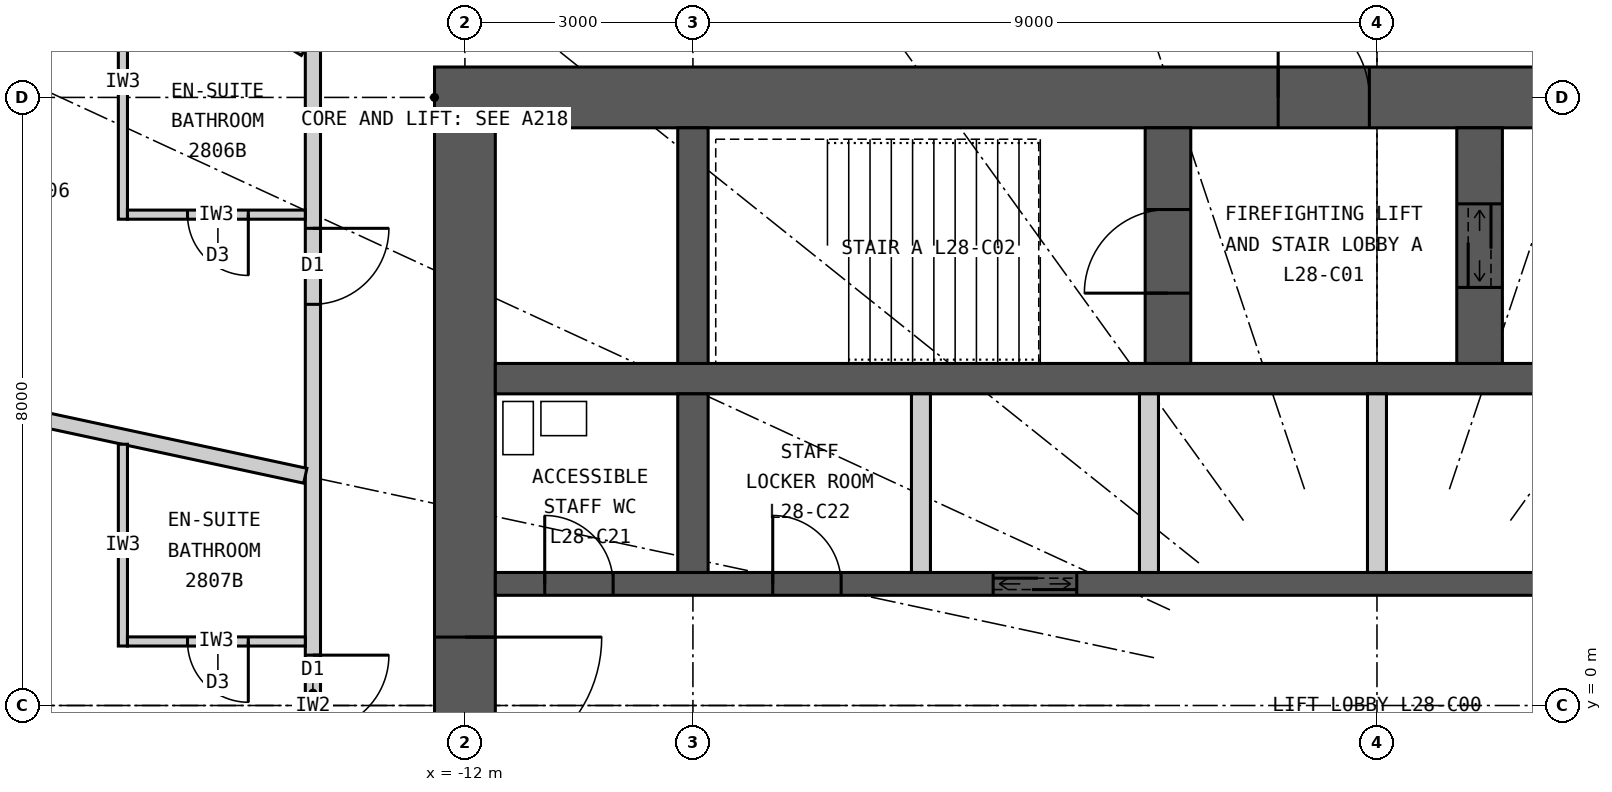
"""IFC4 building model, lengths in metres.
Left out: names, types, materials, properties, quantities, classifications, styles, units other than length and angle.
Written with IfcOpenShell. Run it as: python <this file> out.ifc"""

import sys

from ifc_helpers import new_model, si_unit, direction, frame, frame_2d, origin, place, context, subcontext, project, spatial, rectangle, extrude, element, fill, save


model = new_model("IFC4")
c1 = context("Model", 3, precision=1e-05, world=origin(), true_north=direction((0.0, 1.0)))
c2 = subcontext(c1, "Body", "Model", "MODEL_VIEW")
j1 = project(units=[si_unit("LENGTHUNIT", "METRE"), si_unit("PLANEANGLEUNIT", "RADIAN")], contexts=[c1])
p1 = place(None, origin())
s1 = spatial("IfcSite", under=j1, at=p1, CompositionType="ELEMENT")
p2 = place(p1, origin())
s2 = spatial("IfcBuilding", under=s1, at=p2, CompositionType="ELEMENT")
p3 = place(p2, frame((0.0, 0.0, 112.2)))
s3 = spatial("IfcBuildingStorey", under=s2, at=p3, CompositionType="ELEMENT", Elevation=112.2)
p4 = place(p3, frame((-12.4, 8.0, 0.0), z_axis=(0.0, 0.0, 1.0), x_axis=(1.0, 0.0, 0.0)))
e1 = element("IfcWall", 1, at=p4, inside=s3, PredefinedType="SHEAR", context=c2, shape_type="SweptSolid", body=[
    extrude(rectangle(XDim=24.8, YDim=0.8, at=frame_2d((12.4, 0.0))), origin(), (0.0, 0.0, 1.0), 3.3),
])
p5 = place(p4, frame((11.1, 0.0, 0.0)))
e2 = element("IfcOpeningElement", 2, at=p5, cuts=e1, PredefinedType="OPENING", context=c2, shape_type="SweptSolid", body=[
    extrude(rectangle(XDim=1.2, YDim=2.2, at=frame_2d((0.6, 1.1))), frame((0.0, 0.41, 0.0), z_axis=(0.0, -1.0, 0.0), x_axis=(1.0, 0.0, 0.0)), (0.0, 0.0, 1.0), 0.82),
])
p6 = place(p4, frame((18.7, 0.0, 0.0)))
e3 = element("IfcOpeningElement", 3, at=p6, cuts=e1, PredefinedType="OPENING", context=c2, shape_type="SweptSolid", body=[
    extrude(rectangle(XDim=0.9, YDim=2.2, at=frame_2d((0.45, 1.1))), frame((0.0, 0.41, 0.0), z_axis=(0.0, -1.0, 0.0), x_axis=(1.0, 0.0, 0.0)), (0.0, 0.0, 1.0), 0.82),
])
p7 = place(p3, frame((-12.0, 7.6, 0.0), z_axis=(0.0, 0.0, 1.0), x_axis=(0.0, -1.0, 0.0)))
e4 = element("IfcWall", 4, at=p7, inside=s3, PredefinedType="SHEAR", context=c2, shape_type="SweptSolid", body=[
    extrude(rectangle(XDim=15.2, YDim=0.8, at=frame_2d((7.6, 0.0))), origin(), (0.0, 0.0, 1.0), 3.3),
])
p8 = place(p7, frame((6.7, 0.0, 0.0)))
e5 = element("IfcOpeningElement", 5, at=p8, cuts=e4, PredefinedType="OPENING", context=c2, shape_type="SweptSolid", body=[
    extrude(rectangle(XDim=1.8, YDim=2.2, at=frame_2d((0.9, 1.1))), frame((0.0, 0.41, 0.0), z_axis=(0.0, -1.0, 0.0), x_axis=(1.0, 0.0, 0.0)), (0.0, 0.0, 1.0), 0.82),
])
p9 = place(p3, frame((-11.6, 4.3, 0.0), z_axis=(0.0, 0.0, 1.0), x_axis=(1.0, 0.0, 0.0)))
e6 = element("IfcWall", 6, at=p9, inside=s3, PredefinedType="SHEAR", context=c2, shape_type="SweptSolid", body=[
    extrude(rectangle(XDim=23.2, YDim=0.4, at=frame_2d((11.6, 0.0))), origin(), (0.0, 0.0, 1.0), 3.3),
])
p10 = place(p3, frame((-11.6, 1.6, 0.0), z_axis=(0.0, 0.0, 1.0), x_axis=(1.0, 0.0, 0.0)))
e7 = element("IfcWall", 7, at=p10, inside=s3, PredefinedType="SHEAR", context=c2, shape_type="SweptSolid", body=[
    extrude(rectangle(XDim=23.2, YDim=0.3, at=frame_2d((11.6, 0.0))), origin(), (0.0, 0.0, 1.0), 3.3),
])
p11 = place(p10, frame((6.55, 0.0, 0.0)))
e8 = element("IfcOpeningElement", 8, at=p11, cuts=e7, PredefinedType="OPENING", context=c2, shape_type="SweptSolid", body=[
    extrude(rectangle(XDim=1.1, YDim=2.2, at=frame_2d((0.55, 1.1))), frame((0.0, 0.16, 0.0), z_axis=(0.0, -1.0, 0.0), x_axis=(1.0, 0.0, 0.0)), (0.0, 0.0, 1.0), 0.32),
])
p12 = place(p10, frame((0.65, 0.0, 0.0)))
e9 = element("IfcOpeningElement", 9, at=p12, cuts=e7, PredefinedType="OPENING", context=c2, shape_type="SweptSolid", body=[
    extrude(rectangle(XDim=0.9, YDim=2.2, at=frame_2d((0.45, 1.1))), frame((0.0, 0.16, 0.0), z_axis=(0.0, -1.0, 0.0), x_axis=(1.0, 0.0, 0.0)), (0.0, 0.0, 1.0), 0.32),
])
p13 = place(p10, frame((3.65, 0.0, 0.0)))
e10 = element("IfcOpeningElement", 10, at=p13, cuts=e7, PredefinedType="OPENING", context=c2, shape_type="SweptSolid", body=[
    extrude(rectangle(XDim=0.9, YDim=2.2, at=frame_2d((0.45, 1.1))), frame((0.0, 0.16, 0.0), z_axis=(0.0, -1.0, 0.0), x_axis=(1.0, 0.0, 0.0)), (0.0, 0.0, 1.0), 0.32),
])
p14 = place(p10, frame((21.65, 0.0, 0.0)))
e11 = element("IfcOpeningElement", 11, at=p14, cuts=e7, PredefinedType="OPENING", context=c2, shape_type="SweptSolid", body=[
    extrude(rectangle(XDim=0.9, YDim=2.2, at=frame_2d((0.45, 1.1))), frame((0.0, 0.16, 0.0), z_axis=(0.0, -1.0, 0.0), x_axis=(1.0, 0.0, 0.0)), (0.0, 0.0, 1.0), 0.32),
])
p15 = place(p3, frame((-9.0, 4.5, 0.0), z_axis=(0.0, 0.0, 1.0), x_axis=(0.0, 1.0, 0.0)))
e12 = element("IfcWall", 12, at=p15, inside=s3, PredefinedType="SHEAR", context=c2, shape_type="SweptSolid", body=[
    extrude(rectangle(XDim=3.1, YDim=0.4, at=frame_2d((1.55, 0.0))), origin(), (0.0, 0.0, 1.0), 3.3),
])
p16 = place(p3, frame((-9.0, 1.75, 0.0), z_axis=(0.0, 0.0, 1.0), x_axis=(0.0, 1.0, 0.0)))
e13 = element("IfcWall", 13, at=p16, inside=s3, PredefinedType="SHEAR", context=c2, shape_type="SweptSolid", body=[
    extrude(rectangle(XDim=2.35, YDim=0.4, at=frame_2d((1.175, 0.0))), origin(), (0.0, 0.0, 1.0), 3.3),
])
p17 = place(p3, frame((-2.75, 4.5, 0.0), z_axis=(0.0, 0.0, 1.0), x_axis=(0.0, 1.0, 0.0)))
e14 = element("IfcWall", 14, at=p17, inside=s3, PredefinedType="SHEAR", context=c2, shape_type="SweptSolid", body=[
    extrude(rectangle(XDim=3.1, YDim=0.6, at=frame_2d((1.55, 0.0))), origin(), (0.0, 0.0, 1.0), 3.3),
])
p18 = place(p17, frame((0.925, 0.0, 0.0)))
e15 = element("IfcOpeningElement", 15, at=p18, cuts=e14, PredefinedType="OPENING", context=c2, shape_type="SweptSolid", body=[
    extrude(rectangle(XDim=1.1, YDim=2.2, at=frame_2d((0.55, 1.1))), frame((0.0, 0.31, 0.0), z_axis=(0.0, -1.0, 0.0), x_axis=(1.0, 0.0, 0.0)), (0.0, 0.0, 1.0), 0.62),
])
p19 = place(p3, frame((1.35, 4.5, 0.0), z_axis=(0.0, 0.0, 1.0), x_axis=(0.0, 1.0, 0.0)))
e16 = element("IfcWall", 16, at=p19, inside=s3, PredefinedType="SHEAR", context=c2, shape_type="SweptSolid", body=[
    extrude(rectangle(XDim=3.1, YDim=0.6, at=frame_2d((1.55, 0.0))), origin(), (0.0, 0.0, 1.0), 3.3),
])
p20 = place(p19, frame((1.0, 0.0, 0.0)))
e17 = element("IfcOpeningElement", 17, at=p20, cuts=e16, PredefinedType="OPENING", context=c2, shape_type="SweptSolid", body=[
    extrude(rectangle(XDim=1.1, YDim=2.2, at=frame_2d((0.55, 1.1))), frame((0.0, 0.31, 0.0), z_axis=(0.0, -1.0, 0.0), x_axis=(1.0, 0.0, 0.0)), (0.0, 0.0, 1.0), 0.62),
])
for number, where, z_axis, x_axis in (
    (18, (-6.0, 1.75, 0.0), (0.0, 0.0, 1.0), (0.0, 1.0, 0.0)),
    (19, (-3.0, 1.75, 0.0), (0.0, 0.0, 1.0), (0.0, 1.0, 0.0)),
    (20, (0.0, 1.75, 0.0), (0.0, 0.0, 1.0), (0.0, 1.0, 0.0)),
):
    element("IfcWall", number, at=place(p3, frame(where, z_axis=z_axis, x_axis=x_axis)), inside=s3, PredefinedType="PARTITIONING", context=c2, shape_type="SweptSolid", body=[
        extrude(rectangle(XDim=2.35, YDim=0.25, at=frame_2d((1.175, 0.0))), origin(), (0.0, 0.0, 1.0), 3.3),
    ])
p21 = place(p3, frame((-14.0, 9.9, 0.0), z_axis=(0.0, 0.0, 1.0), x_axis=(0.0, -1.0, 0.0)))
e21 = element("IfcWall", 21, at=p21, inside=s3, PredefinedType="PARTITIONING", context=c2, shape_type="SweptSolid", body=[
    extrude(rectangle(XDim=19.8, YDim=0.2, at=frame_2d((9.9, 0.0))), origin(), (0.0, 0.0, 1.0), 3.12),
])
p22 = place(p21, frame((3.622, 0.0, 0.0)))
e22 = element("IfcOpeningElement", 22, at=p22, cuts=e21, PredefinedType="OPENING", context=c2, shape_type="SweptSolid", body=[
    extrude(rectangle(XDim=1.0, YDim=2.2, at=frame_2d((0.5, 1.1))), frame((0.0, 0.11, 0.0), z_axis=(0.0, -1.0, 0.0), x_axis=(1.0, 0.0, 0.0)), (0.0, 0.0, 1.0), 0.22),
])
p23 = place(p21, frame((9.238, 0.0, 0.0)))
e23 = element("IfcOpeningElement", 23, at=p23, cuts=e21, PredefinedType="OPENING", context=c2, shape_type="SweptSolid", body=[
    extrude(rectangle(XDim=1.0, YDim=2.2, at=frame_2d((0.5, 1.1))), frame((0.0, 0.11, 0.0), z_axis=(0.0, -1.0, 0.0), x_axis=(1.0, 0.0, 0.0)), (0.0, 0.0, 1.0), 0.22),
])
p24 = place(p21, frame((13.742, 0.0, 0.0)))
e24 = element("IfcOpeningElement", 24, at=p24, cuts=e21, PredefinedType="OPENING", context=c2, shape_type="SweptSolid", body=[
    extrude(rectangle(XDim=1.0, YDim=2.2, at=frame_2d((0.5, 1.1))), frame((0.0, 0.11, 0.0), z_axis=(0.0, -1.0, 0.0), x_axis=(1.0, 0.0, 0.0)), (0.0, 0.0, 1.0), 0.22),
])
p25 = place(p21, frame((18.698, 0.0, 0.0)))
e25 = element("IfcOpeningElement", 25, at=p25, cuts=e21, PredefinedType="OPENING", context=c2, shape_type="SweptSolid", body=[
    extrude(rectangle(XDim=1.0, YDim=2.2, at=frame_2d((0.5, 1.1))), frame((0.0, 0.11, 0.0), z_axis=(0.0, -1.0, 0.0), x_axis=(1.0, 0.0, 0.0)), (0.0, 0.0, 1.0), 0.22),
])
p26 = place(p3, frame((-14.1, 8.638, 0.0), z_axis=(0.0, 0.0, 1.0), x_axis=(-0.852706758009, 0.5223898782, 0.0)))
e26 = element("IfcWall", 26, at=p26, inside=s3, PredefinedType="PARTITIONING", context=c2, shape_type="SweptSolid", body=[
    extrude(rectangle(XDim=6.019, YDim=0.2, at=frame_2d((3.009, 0.0))), origin(), (0.0, 0.0, 1.0), 3.12),
])
p27 = place(p3, frame((-14.1, 3.022, 0.0), z_axis=(0.0, 0.0, 1.0), x_axis=(-0.977783513367, 0.209617272638, 0.0)))
e27 = element("IfcWall", 27, at=p27, inside=s3, PredefinedType="PARTITIONING", context=c2, shape_type="SweptSolid", body=[
    extrude(rectangle(XDim=8.508, YDim=0.2, at=frame_2d((4.254, 0.0))), origin(), (0.0, 0.0, 1.0), 2.37),
])
p28 = place(p3, frame((-16.5, 10.008, 0.0), z_axis=(0.0, 0.0, 1.0), x_axis=(0.0, -1.0, 0.0)))
e28 = element("IfcWall", 28, at=p28, inside=s3, PredefinedType="PARTITIONING", context=c2, shape_type="SweptSolid", body=[
    extrude(rectangle(XDim=3.61, YDim=0.12, at=frame_2d((1.805, 0.0))), origin(), (0.0, 0.0, 1.0), 3.12),
])
p29 = place(p3, frame((-14.1, 6.458, 0.0), z_axis=(0.0, 0.0, 1.0), x_axis=(-1.0, 0.0, 0.0)))
e29 = element("IfcWall", 29, at=p29, inside=s3, PredefinedType="PARTITIONING", context=c2, shape_type="SweptSolid", body=[
    extrude(rectangle(XDim=2.34, YDim=0.12, at=frame_2d((1.17, 0.0))), origin(), (0.0, 0.0, 1.0), 3.12),
])
p30 = place(p29, frame((0.75, 0.0, 0.0)))
e30 = element("IfcOpeningElement", 30, at=p30, cuts=e29, PredefinedType="OPENING", context=c2, shape_type="SweptSolid", body=[
    extrude(rectangle(XDim=0.8, YDim=2.1, at=frame_2d((0.4, 1.05))), frame((0.0, 0.07, 0.0), z_axis=(0.0, -1.0, 0.0), x_axis=(1.0, 0.0, 0.0)), (0.0, 0.0, 1.0), 0.14),
])
p31 = place(p3, frame((-16.5, 3.437, 0.0), z_axis=(0.0, 0.0, 1.0), x_axis=(0.0, -1.0, 0.0)))
e31 = element("IfcWall", 31, at=p31, inside=s3, PredefinedType="PARTITIONING", context=c2, shape_type="SweptSolid", body=[
    extrude(rectangle(XDim=2.655, YDim=0.12, at=frame_2d((1.327, 0.0))), origin(), (0.0, 0.0, 1.0), 3.12),
])
p32 = place(p3, frame((-14.1, 0.843, 0.0), z_axis=(0.0, 0.0, 1.0), x_axis=(-1.0, 0.0, 0.0)))
e32 = element("IfcWall", 32, at=p32, inside=s3, PredefinedType="PARTITIONING", context=c2, shape_type="SweptSolid", body=[
    extrude(rectangle(XDim=2.34, YDim=0.12, at=frame_2d((1.17, 0.0))), origin(), (0.0, 0.0, 1.0), 3.12),
])
p33 = place(p32, frame((0.75, 0.0, 0.0)))
e33 = element("IfcOpeningElement", 33, at=p33, cuts=e32, PredefinedType="OPENING", context=c2, shape_type="SweptSolid", body=[
    extrude(rectangle(XDim=0.8, YDim=2.1, at=frame_2d((0.4, 1.05))), frame((0.0, 0.07, 0.0), z_axis=(0.0, -1.0, 0.0), x_axis=(1.0, 0.0, 0.0)), (0.0, 0.0, 1.0), 0.14),
])
p34 = place(p30, origin())
e34 = element("IfcDoor", 34, at=p34, inside=s3, OperationType="SINGLE_SWING_LEFT", PredefinedType="DOOR", context=c2, shape_type="SweptSolid", body=[
    extrude(rectangle(XDim=0.8, YDim=2.1, at=frame_2d((0.4, 1.05))), frame((0.0, 0.025, 0.0), z_axis=(0.0, -1.0, 0.0), x_axis=(1.0, 0.0, 0.0)), (0.0, 0.0, 1.0), 0.05),
])
fill(e30, e34)
p35 = place(p22, origin())
e35 = element("IfcDoor", 35, at=p35, inside=s3, OperationType="SINGLE_SWING_LEFT", PredefinedType="DOOR", context=c2, shape_type="SweptSolid", body=[
    extrude(rectangle(XDim=1.0, YDim=2.2, at=frame_2d((0.5, 1.1))), frame((0.0, 0.025, 0.0), z_axis=(0.0, -1.0, 0.0), x_axis=(1.0, 0.0, 0.0)), (0.0, 0.0, 1.0), 0.05),
])
fill(e22, e35)
p36 = place(p33, origin())
e36 = element("IfcDoor", 36, at=p36, inside=s3, OperationType="SINGLE_SWING_LEFT", PredefinedType="DOOR", context=c2, shape_type="SweptSolid", body=[
    extrude(rectangle(XDim=0.8, YDim=2.1, at=frame_2d((0.4, 1.05))), frame((0.0, 0.025, 0.0), z_axis=(0.0, -1.0, 0.0), x_axis=(1.0, 0.0, 0.0)), (0.0, 0.0, 1.0), 0.05),
])
fill(e33, e36)
p37 = place(p23, origin())
e37 = element("IfcDoor", 37, at=p37, inside=s3, OperationType="SINGLE_SWING_LEFT", PredefinedType="DOOR", context=c2, shape_type="SweptSolid", body=[
    extrude(rectangle(XDim=1.0, YDim=2.2, at=frame_2d((0.5, 1.1))), frame((0.0, 0.025, 0.0), z_axis=(0.0, -1.0, 0.0), x_axis=(1.0, 0.0, 0.0)), (0.0, 0.0, 1.0), 0.05),
])
fill(e23, e37)
p38 = place(p5, origin())
e38 = element("IfcDoor", 38, at=p38, inside=s3, OperationType="SINGLE_SWING_LEFT", PredefinedType="DOOR", context=c2, shape_type="SweptSolid", body=[
    extrude(rectangle(XDim=1.2, YDim=2.2, at=frame_2d((0.6, 1.1))), frame((0.0, 0.025, 0.0), z_axis=(0.0, -1.0, 0.0), x_axis=(1.0, 0.0, 0.0)), (0.0, 0.0, 1.0), 0.05),
])
fill(e2, e38)
p39 = place(p18, origin())
e39 = element("IfcDoor", 39, at=p39, inside=s3, OperationType="SINGLE_SWING_LEFT", PredefinedType="DOOR", context=c2, shape_type="SweptSolid", body=[
    extrude(rectangle(XDim=1.1, YDim=2.2, at=frame_2d((0.55, 1.1))), frame((0.0, 0.025, 0.0), z_axis=(0.0, -1.0, 0.0), x_axis=(1.0, 0.0, 0.0)), (0.0, 0.0, 1.0), 0.05),
])
fill(e15, e39)
p40 = place(p20, origin())
e40 = element("IfcDoor", 40, at=p40, inside=s3, OperationType="DOUBLE_DOOR_SLIDING", PredefinedType="DOOR", context=c2, shape_type="SweptSolid", body=[
    extrude(rectangle(XDim=1.1, YDim=2.2, at=frame_2d((0.55, 1.1))), frame((0.0, 0.025, 0.0), z_axis=(0.0, -1.0, 0.0), x_axis=(1.0, 0.0, 0.0)), (0.0, 0.0, 1.0), 0.05),
])
fill(e17, e40)
p41 = place(p11, origin())
e41 = element("IfcDoor", 41, at=p41, inside=s3, OperationType="DOUBLE_DOOR_SLIDING", PredefinedType="DOOR", context=c2, shape_type="SweptSolid", body=[
    extrude(rectangle(XDim=1.1, YDim=2.2, at=frame_2d((0.55, 1.1))), frame((0.0, 0.025, 0.0), z_axis=(0.0, -1.0, 0.0), x_axis=(1.0, 0.0, 0.0)), (0.0, 0.0, 1.0), 0.05),
])
fill(e8, e41)
p42 = place(p12, origin())
e42 = element("IfcDoor", 42, at=p42, inside=s3, OperationType="SINGLE_SWING_LEFT", PredefinedType="DOOR", context=c2, shape_type="SweptSolid", body=[
    extrude(rectangle(XDim=0.9, YDim=2.2, at=frame_2d((0.45, 1.1))), frame((0.0, 0.025, 0.0), z_axis=(0.0, -1.0, 0.0), x_axis=(1.0, 0.0, 0.0)), (0.0, 0.0, 1.0), 0.05),
])
fill(e9, e42)
p43 = place(p13, origin())
e43 = element("IfcDoor", 43, at=p43, inside=s3, OperationType="SINGLE_SWING_LEFT", PredefinedType="DOOR", context=c2, shape_type="SweptSolid", body=[
    extrude(rectangle(XDim=0.9, YDim=2.2, at=frame_2d((0.45, 1.1))), frame((0.0, 0.025, 0.0), z_axis=(0.0, -1.0, 0.0), x_axis=(1.0, 0.0, 0.0)), (0.0, 0.0, 1.0), 0.05),
])
fill(e10, e43)
p44 = place(p8, origin())
e44 = element("IfcDoor", 44, at=p44, inside=s3, OperationType="DOUBLE_DOOR_DOUBLE_SWING", PredefinedType="DOOR", context=c2, shape_type="SweptSolid", body=[
    extrude(rectangle(XDim=1.8, YDim=2.2, at=frame_2d((0.9, 1.1))), frame((0.0, 0.025, 0.0), z_axis=(0.0, -1.0, 0.0), x_axis=(1.0, 0.0, 0.0)), (0.0, 0.0, 1.0), 0.05),
])
fill(e5, e44)
save(model, sys.argv[1])
